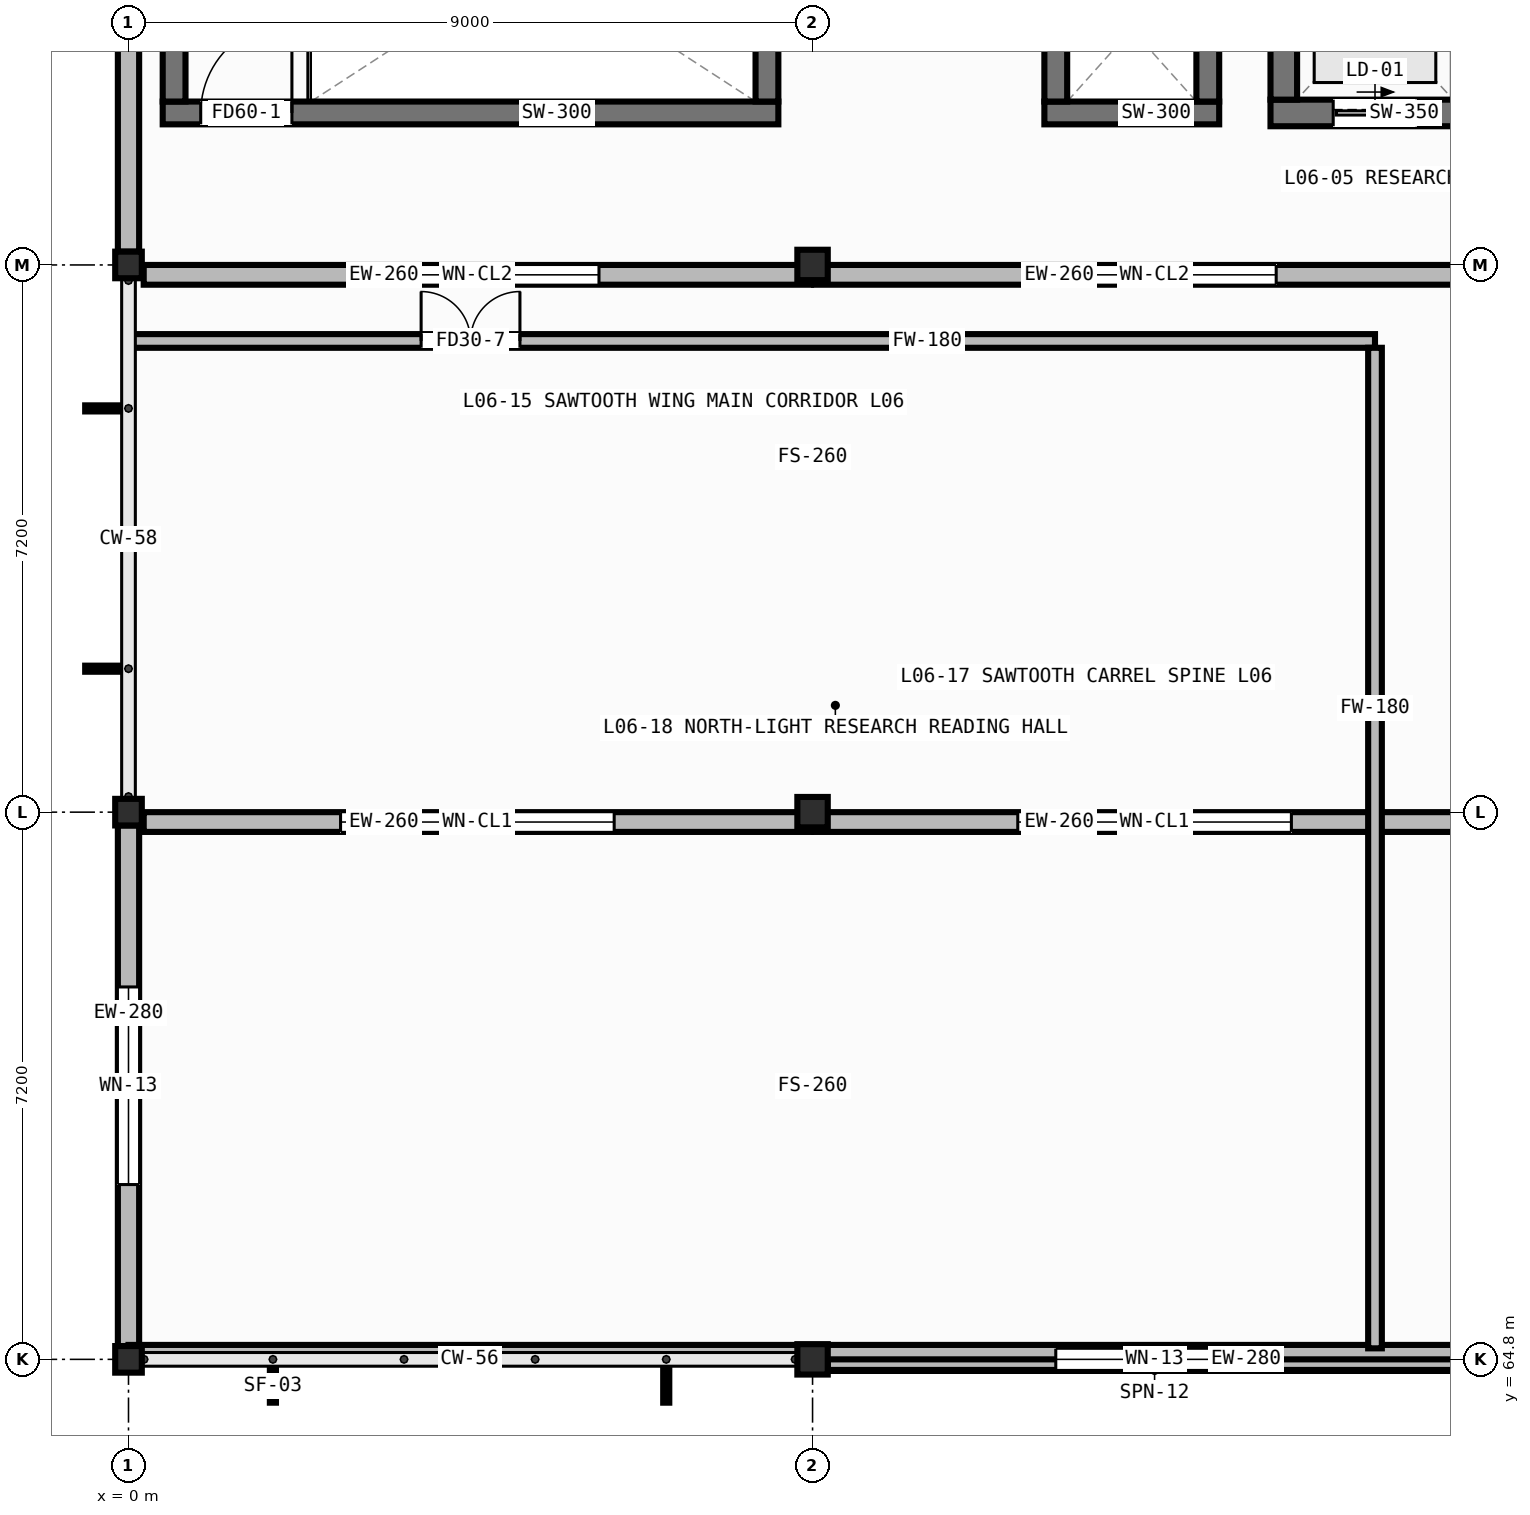
"""IFC4 building model, lengths in metres.
Left out: names, types, materials, properties, quantities, classifications, styles, units other than length and angle.
Written with IfcOpenShell. Run it as: python <this file> out.ifc"""

import sys

from ifc_helpers import new_model, si_unit, direction, frame, frame_2d, origin, origin_2d, place, context, subcontext, project, spatial, rectangle, hollow_rectangle, extrude, element, fill, save


model = new_model("IFC4")
c1 = context("Model", 3, precision=1e-05, world=origin(), true_north=direction((0.0, 1.0)))
c2 = subcontext(c1, "Body", "Model", "MODEL_VIEW")
j1 = project(units=[si_unit("LENGTHUNIT", "METRE"), si_unit("PLANEANGLEUNIT", "RADIAN")], contexts=[c1])
p1 = place(None, origin())
s1 = spatial("IfcSite", under=j1, at=p1, CompositionType="ELEMENT")
p2 = place(p1, origin())
s2 = spatial("IfcBuilding", under=s1, at=p2, CompositionType="ELEMENT")
p3 = place(p2, frame((0.0, 0.0, 20.6)))
s3 = spatial("IfcBuildingStorey", under=s2, at=p3, CompositionType="ELEMENT", Elevation=20.6)
for number, where, z_axis, x_axis in (
    (1, (0.0, 64.8, 0.0), (0.0, 0.0, 1.0), (1.0, 0.0, 0.0)),
    (2, (0.0, 72.0, 0.0), (0.0, 0.0, 1.0), (1.0, 0.0, 0.0)),
    (3, (0.0, 79.2, 0.0), (0.0, 0.0, 1.0), (1.0, 0.0, 0.0)),
):
    element("IfcColumn", number, at=place(p3, frame(where, z_axis=z_axis, x_axis=x_axis)), inside=s3, PredefinedType="COLUMN", context=c2, shape_type="SweptSolid", body=[
        extrude(hollow_rectangle(XDim=0.35, YDim=0.35, WallThickness=0.012, at=origin_2d()), origin(), (0.0, 0.0, 1.0), 3.18),
    ])
for number, where, z_axis, x_axis in (
    (4, (9.0, 64.8, 0.0), (0.0, 0.0, 1.0), (1.0, 0.0, 0.0)),
    (5, (9.0, 72.0, 0.0), (0.0, 0.0, 1.0), (1.0, 0.0, 0.0)),
    (6, (9.0, 79.2, 0.0), (0.0, 0.0, 1.0), (1.0, 0.0, 0.0)),
):
    element("IfcColumn", number, at=place(p3, frame(where, z_axis=z_axis, x_axis=x_axis)), inside=s3, PredefinedType="COLUMN", context=c2, shape_type="SweptSolid", body=[
        extrude(hollow_rectangle(XDim=0.4, YDim=0.4, WallThickness=0.016, at=origin_2d()), origin(), (0.0, 0.0, 1.0), 3.18),
    ])
p4 = place(p3, frame((9.2, 64.8, 0.0), z_axis=(0.0, 0.0, 1.0), x_axis=(1.0, 0.0, 0.0)))
e7 = element("IfcWall", 7, at=p4, inside=s3, PredefinedType="STANDARD", context=c2, shape_type="SweptSolid", body=[
    extrude(rectangle(XDim=8.6, YDim=0.28, at=frame_2d((4.3, 0.0))), origin(), (0.0, 0.0, 1.0), 2.78),
])
p5 = place(p4, frame((3.0, 0.0, 0.85)))
e8 = element("IfcOpeningElement", 8, at=p5, cuts=e7, PredefinedType="OPENING", context=c2, shape_type="SweptSolid", body=[
    extrude(rectangle(XDim=2.6, YDim=1.6, at=frame_2d((1.3, 0.8))), frame((0.0, 0.152, 0.0), z_axis=(0.0, -1.0, 0.0), x_axis=(1.0, 0.0, 0.0)), (0.0, 0.0, 1.0), 0.304),
])
p6 = place(p3, frame((0.0, 64.975, 0.0), z_axis=(0.0, 0.0, 1.0), x_axis=(0.0, 1.0, 0.0)))
e9 = element("IfcWall", 9, at=p6, inside=s3, PredefinedType="STANDARD", context=c2, shape_type="SweptSolid", body=[
    extrude(rectangle(XDim=6.85, YDim=0.28, at=frame_2d((3.425, 0.0))), origin(), (0.0, 0.0, 1.0), 2.78),
])
p7 = place(p6, frame((2.125, 0.0, 0.85)))
e10 = element("IfcOpeningElement", 10, at=p7, cuts=e9, PredefinedType="OPENING", context=c2, shape_type="SweptSolid", body=[
    extrude(rectangle(XDim=2.6, YDim=1.6, at=frame_2d((1.3, 0.8))), frame((0.0, 0.152, 0.0), z_axis=(0.0, -1.0, 0.0), x_axis=(1.0, 0.0, 0.0)), (0.0, 0.0, 1.0), 0.304),
])
p8 = place(p3, frame((0.0, 79.375, 0.0), z_axis=(0.0, 0.0, 1.0), x_axis=(0.0, 1.0, 0.0)))
e11 = element("IfcWall", 11, at=p8, inside=s3, PredefinedType="STANDARD", context=c2, shape_type="SweptSolid", body=[
    extrude(rectangle(XDim=6.85, YDim=0.28, at=frame_2d((3.425, 0.0))), origin(), (0.0, 0.0, 1.0), 2.78),
])
p9 = place(p3, frame((8.98, 71.87, 3.4), z_axis=(0.0, 0.0, 1.0), x_axis=(-1.0, 0.0, 0.0)))
e12 = element("IfcWall", 12, at=p9, inside=s3, PredefinedType="STANDARD", context=c2, shape_type="SweptSolid", body=[
    extrude(rectangle(XDim=8.78, YDim=0.26, at=frame_2d((4.39, 0.0))), origin(), (0.0, 0.0, 1.0), 2.05),
])
p10 = place(p9, frame((2.59, 0.0, 0.38)))
e13 = element("IfcOpeningElement", 13, at=p10, cuts=e12, PredefinedType="OPENING", context=c2, shape_type="SweptSolid", body=[
    extrude(rectangle(XDim=3.6, YDim=1.2, at=frame_2d((1.8, 0.6))), frame((0.0, 0.142, 0.0), z_axis=(0.0, -1.0, 0.0), x_axis=(1.0, 0.0, 0.0)), (0.0, 0.0, 1.0), 0.284),
])
p11 = place(p3, frame((17.98, 71.87, 3.4), z_axis=(0.0, 0.0, 1.0), x_axis=(-1.0, 0.0, 0.0)))
e14 = element("IfcWall", 14, at=p11, inside=s3, PredefinedType="STANDARD", context=c2, shape_type="SweptSolid", body=[
    extrude(rectangle(XDim=8.96, YDim=0.26, at=frame_2d((4.48, 0.0))), origin(), (0.0, 0.0, 1.0), 2.05),
])
p12 = place(p11, frame((2.68, 0.0, 0.38)))
e15 = element("IfcOpeningElement", 15, at=p12, cuts=e14, PredefinedType="OPENING", context=c2, shape_type="SweptSolid", body=[
    extrude(rectangle(XDim=3.6, YDim=1.2, at=frame_2d((1.8, 0.6))), frame((0.0, 0.142, 0.0), z_axis=(0.0, -1.0, 0.0), x_axis=(1.0, 0.0, 0.0)), (0.0, 0.0, 1.0), 0.284),
])
p13 = place(p3, frame((8.98, 79.07, 3.4), z_axis=(0.0, 0.0, 1.0), x_axis=(-1.0, 0.0, 0.0)))
e16 = element("IfcWall", 16, at=p13, inside=s3, PredefinedType="STANDARD", context=c2, shape_type="SweptSolid", body=[
    extrude(rectangle(XDim=8.78, YDim=0.26, at=frame_2d((4.39, 0.0))), origin(), (0.0, 0.0, 1.0), 2.05),
])
p14 = place(p13, frame((2.79, 0.0, 0.38)))
e17 = element("IfcOpeningElement", 17, at=p14, cuts=e16, PredefinedType="OPENING", context=c2, shape_type="SweptSolid", body=[
    extrude(rectangle(XDim=3.2, YDim=1.1, at=frame_2d((1.6, 0.55))), frame((0.0, 0.142, 0.0), z_axis=(0.0, -1.0, 0.0), x_axis=(1.0, 0.0, 0.0)), (0.0, 0.0, 1.0), 0.284),
])
p15 = place(p3, frame((17.98, 79.07, 3.4), z_axis=(0.0, 0.0, 1.0), x_axis=(-1.0, 0.0, 0.0)))
e18 = element("IfcWall", 18, at=p15, inside=s3, PredefinedType="STANDARD", context=c2, shape_type="SweptSolid", body=[
    extrude(rectangle(XDim=8.96, YDim=0.26, at=frame_2d((4.48, 0.0))), origin(), (0.0, 0.0, 1.0), 2.05),
])
p16 = place(p15, frame((2.88, 0.0, 0.38)))
e19 = element("IfcOpeningElement", 19, at=p16, cuts=e18, PredefinedType="OPENING", context=c2, shape_type="SweptSolid", body=[
    extrude(rectangle(XDim=3.2, YDim=1.1, at=frame_2d((1.6, 0.55))), frame((0.0, 0.142, 0.0), z_axis=(0.0, -1.0, 0.0), x_axis=(1.0, 0.0, 0.0)), (0.0, 0.0, 1.0), 0.284),
])
p17 = place(p3, frame((0.0, 64.895, 3.4), z_axis=(0.0, 0.0, 1.0), x_axis=(1.0, 0.0, 0.0)))
e20 = element("IfcWall", 20, at=p17, inside=s3, PredefinedType="PARAPET", context=c2, shape_type="SweptSolid", body=[
    extrude(rectangle(XDim=36.0, YDim=0.19, at=frame_2d((18.0, 0.0))), origin(), (0.0, 0.0, 1.0), 0.75),
])
p18 = place(p3, frame((0.45, 81.2, 0.0), z_axis=(0.0, 0.0, 1.0), x_axis=(1.0, 0.0, 0.0)))
e21 = element("IfcWall", 21, at=p18, inside=s3, PredefinedType="SHEAR", context=c2, shape_type="SweptSolid", body=[
    extrude(rectangle(XDim=8.1, YDim=0.3, at=frame_2d((4.05, 0.0))), origin(), (0.0, 0.0, 1.0), 3.18),
])
p19 = place(p18, frame((0.5, 0.0, 0.0)))
e22 = element("IfcOpeningElement", 22, at=p19, cuts=e21, PredefinedType="OPENING", context=c2, shape_type="SweptSolid", body=[
    extrude(rectangle(XDim=1.2, YDim=2.1, at=frame_2d((0.6, 1.05))), frame((0.0, 0.162, 0.0), z_axis=(0.0, -1.0, 0.0), x_axis=(1.0, 0.0, 0.0)), (0.0, 0.0, 1.0), 0.324),
])
for number, where, z_axis, x_axis in (
    (23, (0.6, 81.35, 0.0), (0.0, 0.0, 1.0), (0.0, 1.0, 0.0)),
    (24, (8.4, 81.35, 0.0), (0.0, 0.0, 1.0), (0.0, 1.0, 0.0)),
):
    element("IfcWall", number, at=place(p3, frame(where, z_axis=z_axis, x_axis=x_axis)), inside=s3, PredefinedType="SHEAR", context=c2, shape_type="SweptSolid", body=[
        extrude(rectangle(XDim=3.8, YDim=0.3, at=frame_2d((1.9, 0.0))), origin(), (0.0, 0.0, 1.0), 3.18),
    ])
p20 = place(p3, frame((15.025, 81.2, 0.0), z_axis=(0.0, 0.0, 1.0), x_axis=(1.0, 0.0, 0.0)))
e25 = element("IfcWall", 25, at=p20, inside=s3, PredefinedType="SHEAR", context=c2, shape_type="SweptSolid", body=[
    extrude(rectangle(XDim=2.75, YDim=0.35, at=frame_2d((1.375, 0.0))), origin(), (0.0, 0.0, 1.0), 3.18),
])
p21 = place(p20, frame((0.825, 0.0, 0.0)))
e26 = element("IfcOpeningElement", 26, at=p21, cuts=e25, PredefinedType="OPENING", context=c2, shape_type="SweptSolid", body=[
    extrude(rectangle(XDim=1.1, YDim=2.1, at=frame_2d((0.55, 1.05))), frame((0.0, 0.187, 0.0), z_axis=(0.0, -1.0, 0.0), x_axis=(1.0, 0.0, 0.0)), (0.0, 0.0, 1.0), 0.374),
])
p22 = place(p3, frame((15.2, 81.375, 0.0), z_axis=(0.0, 0.0, 1.0), x_axis=(0.0, 1.0, 0.0)))
e27 = element("IfcWall", 27, at=p22, inside=s3, PredefinedType="SHEAR", context=c2, shape_type="SweptSolid", body=[
    extrude(rectangle(XDim=2.25, YDim=0.35, at=frame_2d((1.125, 0.0))), origin(), (0.0, 0.0, 1.0), 3.18),
])
p23 = place(p3, frame((12.05, 81.2, 0.0), z_axis=(0.0, 0.0, 1.0), x_axis=(1.0, 0.0, 0.0)))
e28 = element("IfcWall", 28, at=p23, inside=s3, PredefinedType="SHEAR", context=c2, shape_type="SweptSolid", body=[
    extrude(rectangle(XDim=2.3, YDim=0.3, at=frame_2d((1.15, 0.0))), origin(), (0.0, 0.0, 1.0), 3.18),
])
for number, where, z_axis, x_axis in (
    (29, (12.2, 81.35, 0.0), (0.0, 0.0, 1.0), (0.0, 1.0, 0.0)),
    (30, (14.2, 81.35, 0.0), (0.0, 0.0, 1.0), (0.0, 1.0, 0.0)),
):
    element("IfcWall", number, at=place(p3, frame(where, z_axis=z_axis, x_axis=x_axis)), inside=s3, PredefinedType="SHEAR", context=c2, shape_type="SweptSolid", body=[
        extrude(rectangle(XDim=1.9, YDim=0.3, at=frame_2d((0.95, 0.0))), origin(), (0.0, 0.0, 1.0), 3.18),
    ])
p24 = place(p3, frame((0.035, 78.2, 0.0), z_axis=(0.0, 0.0, 1.0), x_axis=(1.0, 0.0, 0.0)))
e31 = element("IfcWall", 31, at=p24, inside=s3, PredefinedType="PARTITIONING", context=c2, shape_type="SweptSolid", body=[
    extrude(rectangle(XDim=16.365, YDim=0.18, at=frame_2d((8.183, 0.0))), origin(), (0.0, 0.0, 1.0), 3.18),
])
p25 = place(p24, frame((3.815, 0.0, 0.0)))
e32 = element("IfcOpeningElement", 32, at=p25, cuts=e31, PredefinedType="OPENING", context=c2, shape_type="SweptSolid", body=[
    extrude(rectangle(XDim=1.3, YDim=2.08, at=frame_2d((0.65, 1.04))), frame((0.0, 0.102, 0.0), z_axis=(0.0, -1.0, 0.0), x_axis=(1.0, 0.0, 0.0)), (0.0, 0.0, 1.0), 0.204),
])
p26 = place(p3, frame((16.4, 64.945, 0.0), z_axis=(0.0, 0.0, 1.0), x_axis=(0.0, 1.0, 0.0)))
e33 = element("IfcWall", 33, at=p26, inside=s3, PredefinedType="PARTITIONING", context=c2, shape_type="SweptSolid", body=[
    extrude(rectangle(XDim=13.165, YDim=0.18, at=frame_2d((6.583, 0.0))), origin(), (0.0, 0.0, 1.0), 3.18),
])
p27 = place(p5, origin())
e34 = element("IfcWindow", 34, at=p27, inside=s3, PartitioningType="DOUBLE_PANEL_VERTICAL", PredefinedType="WINDOW", context=c2, shape_type="SweptSolid", body=[
    extrude(rectangle(XDim=2.6, YDim=1.6, at=frame_2d((1.3, 0.8))), frame((0.0, 0.03, 0.0), z_axis=(0.0, -1.0, 0.0), x_axis=(1.0, 0.0, 0.0)), (0.0, 0.0, 1.0), 0.06),
])
fill(e8, e34)
p28 = place(p7, origin())
e35 = element("IfcWindow", 35, at=p28, inside=s3, PartitioningType="DOUBLE_PANEL_VERTICAL", PredefinedType="WINDOW", context=c2, shape_type="SweptSolid", body=[
    extrude(rectangle(XDim=2.6, YDim=1.6, at=frame_2d((1.3, 0.8))), frame((0.0, 0.03, 0.0), z_axis=(0.0, -1.0, 0.0), x_axis=(1.0, 0.0, 0.0)), (0.0, 0.0, 1.0), 0.06),
])
fill(e10, e35)
p29 = place(p10, origin())
e36 = element("IfcWindow", 36, at=p29, inside=s3, PartitioningType="DOUBLE_PANEL_VERTICAL", PredefinedType="WINDOW", context=c2, shape_type="SweptSolid", body=[
    extrude(rectangle(XDim=3.6, YDim=1.2, at=frame_2d((1.8, 0.6))), frame((0.0, 0.03, 0.0), z_axis=(0.0, -1.0, 0.0), x_axis=(1.0, 0.0, 0.0)), (0.0, 0.0, 1.0), 0.06),
])
fill(e13, e36)
p30 = place(p12, origin())
e37 = element("IfcWindow", 37, at=p30, inside=s3, PartitioningType="DOUBLE_PANEL_VERTICAL", PredefinedType="WINDOW", context=c2, shape_type="SweptSolid", body=[
    extrude(rectangle(XDim=3.6, YDim=1.2, at=frame_2d((1.8, 0.6))), frame((0.0, 0.03, 0.0), z_axis=(0.0, -1.0, 0.0), x_axis=(1.0, 0.0, 0.0)), (0.0, 0.0, 1.0), 0.06),
])
fill(e15, e37)
p31 = place(p14, origin())
e38 = element("IfcWindow", 38, at=p31, inside=s3, PartitioningType="DOUBLE_PANEL_VERTICAL", PredefinedType="WINDOW", context=c2, shape_type="SweptSolid", body=[
    extrude(rectangle(XDim=3.2, YDim=1.1, at=frame_2d((1.6, 0.55))), frame((0.0, 0.03, 0.0), z_axis=(0.0, -1.0, 0.0), x_axis=(1.0, 0.0, 0.0)), (0.0, 0.0, 1.0), 0.06),
])
fill(e17, e38)
p32 = place(p16, origin())
e39 = element("IfcWindow", 39, at=p32, inside=s3, PartitioningType="DOUBLE_PANEL_VERTICAL", PredefinedType="WINDOW", context=c2, shape_type="SweptSolid", body=[
    extrude(rectangle(XDim=3.2, YDim=1.1, at=frame_2d((1.6, 0.55))), frame((0.0, 0.03, 0.0), z_axis=(0.0, -1.0, 0.0), x_axis=(1.0, 0.0, 0.0)), (0.0, 0.0, 1.0), 0.06),
])
fill(e19, e39)
p33 = place(p19, origin())
e40 = element("IfcDoor", 40, at=p33, inside=s3, OperationType="SINGLE_SWING_RIGHT", PredefinedType="DOOR", context=c2, shape_type="SweptSolid", body=[
    extrude(rectangle(XDim=1.2, YDim=2.1, at=frame_2d((0.6, 1.05))), frame((0.0, 0.025, 0.0), z_axis=(0.0, -1.0, 0.0), x_axis=(1.0, 0.0, 0.0)), (0.0, 0.0, 1.0), 0.05),
])
fill(e22, e40)
p34 = place(p21, origin())
e41 = element("IfcDoor", 41, at=p34, inside=s3, OperationType="SLIDING_TO_LEFT", PredefinedType="DOOR", context=c2, shape_type="SweptSolid", body=[
    extrude(rectangle(XDim=1.1, YDim=2.1, at=frame_2d((0.55, 1.05))), frame((0.0, 0.025, 0.0), z_axis=(0.0, -1.0, 0.0), x_axis=(1.0, 0.0, 0.0)), (0.0, 0.0, 1.0), 0.05),
])
fill(e26, e41)
p35 = place(p25, origin())
e42 = element("IfcDoor", 42, at=p35, inside=s3, OperationType="DOUBLE_DOOR_SINGLE_SWING", PredefinedType="DOOR", context=c2, shape_type="SweptSolid", body=[
    extrude(rectangle(XDim=1.3, YDim=2.08, at=frame_2d((0.65, 1.04))), frame((0.0, 0.025, 0.0), z_axis=(0.0, -1.0, 0.0), x_axis=(1.0, 0.0, 0.0)), (0.0, 0.0, 1.0), 0.05),
])
fill(e32, e42)
save(model, sys.argv[1])
